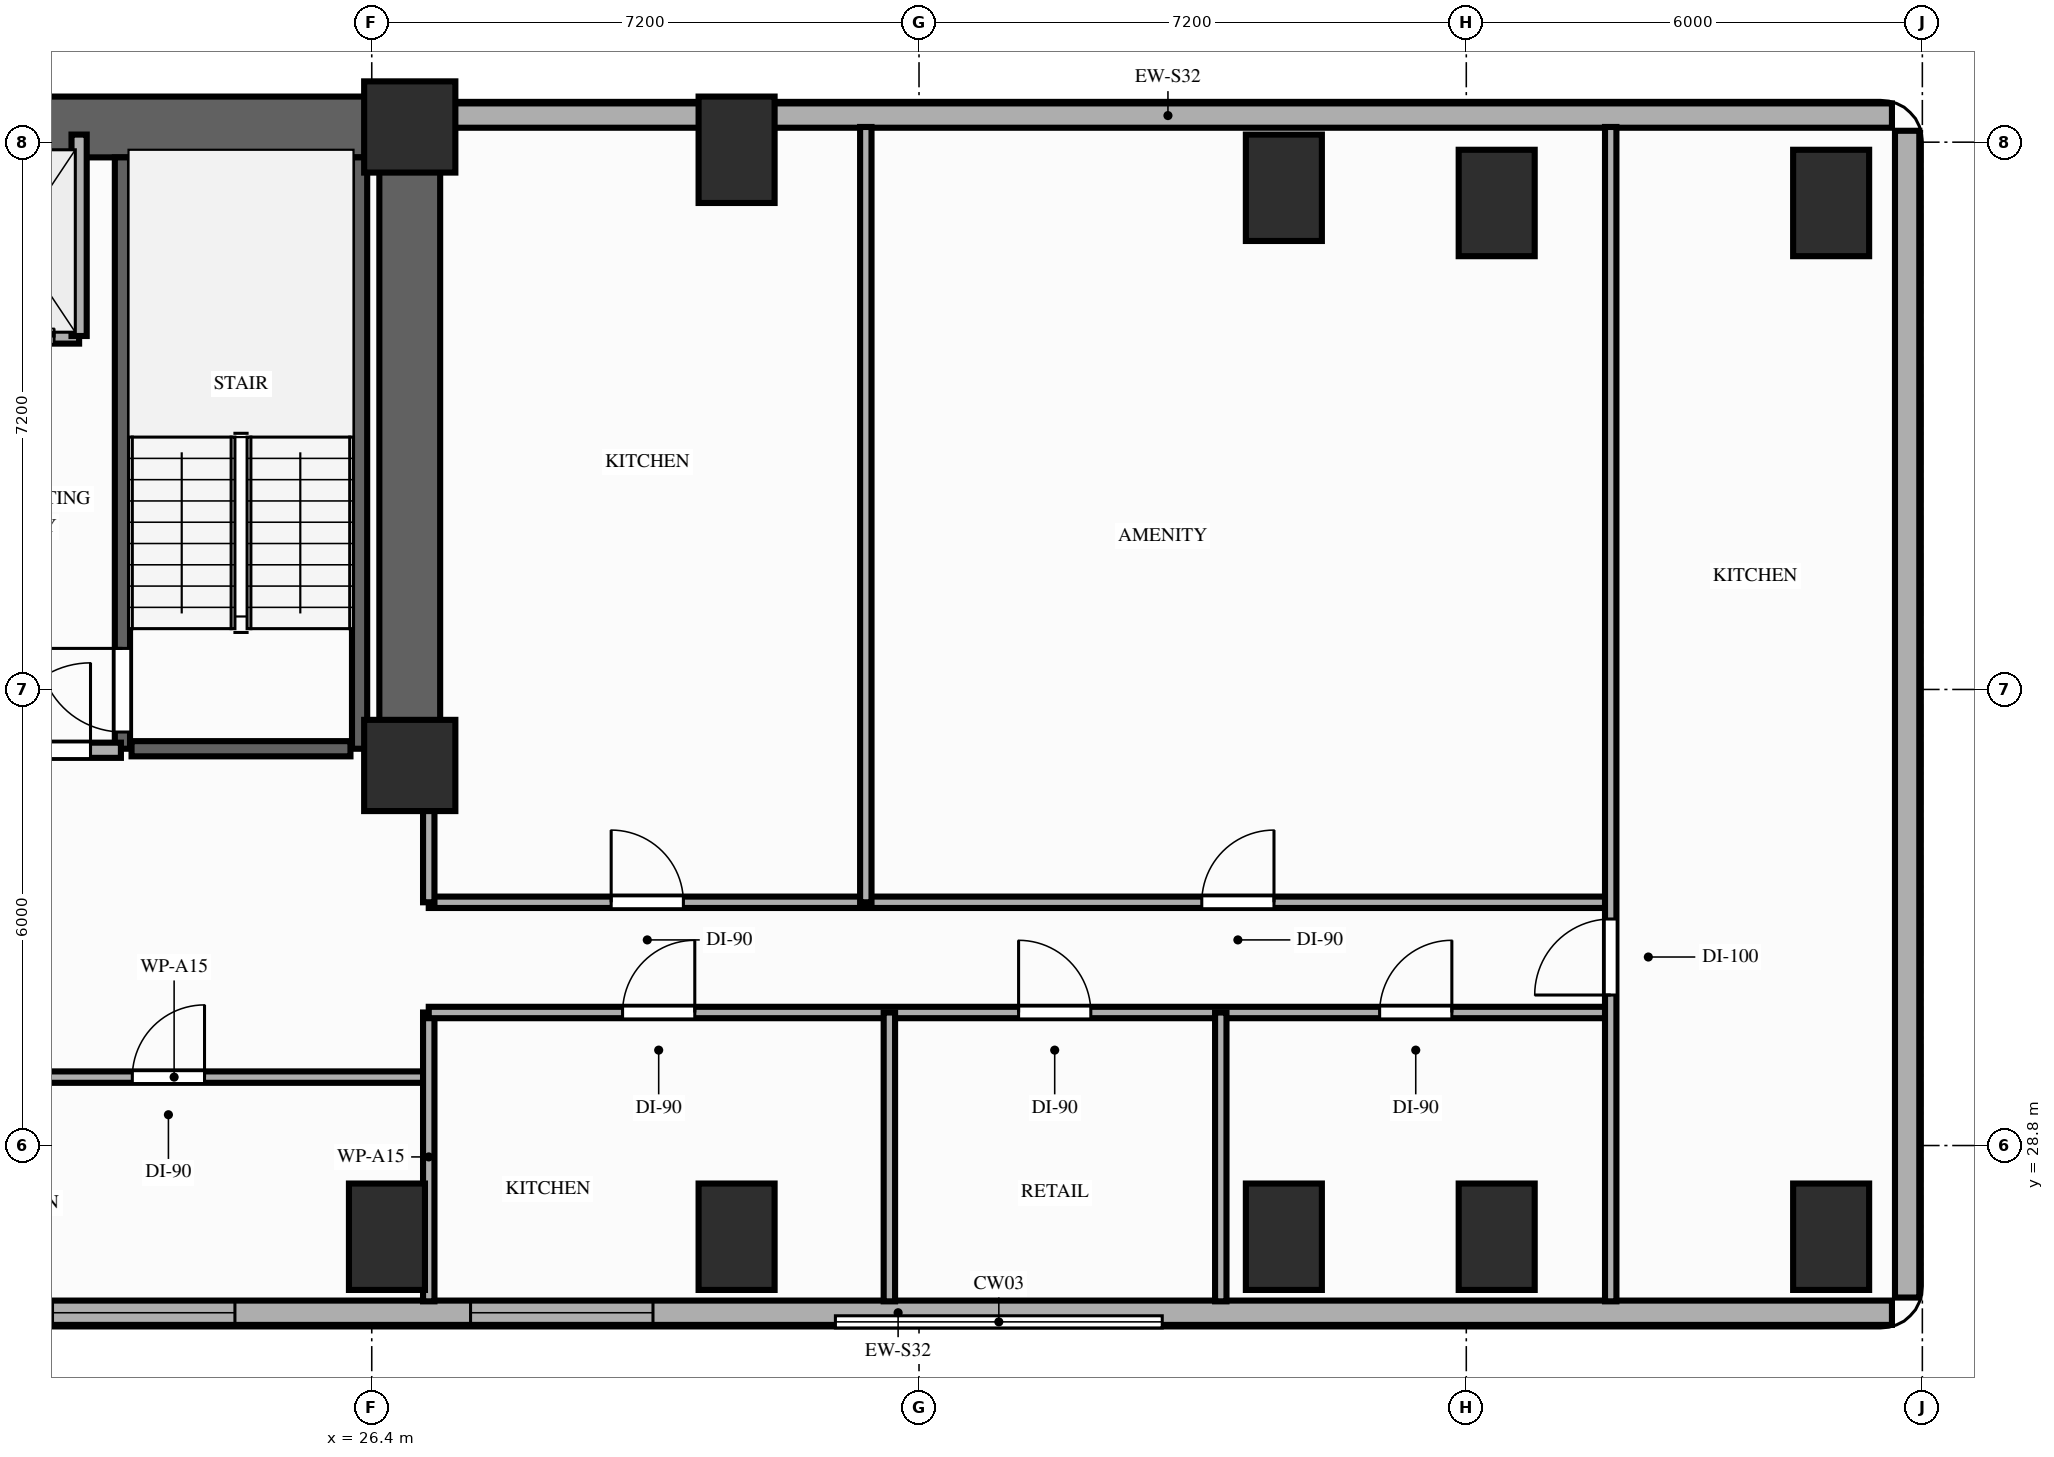
"""IFC4 building model, lengths in metres.
Left out: names, types, materials, properties, quantities, classifications, styles, units other than length and angle.
Written with IfcOpenShell. Run it as: python <this file> out.ifc"""

import sys

from ifc_helpers import new_model, si_unit, direction, frame, frame_2d, origin, origin_2d, place, context, subcontext, project, spatial, rectangle, extrude, element, fill, save


model = new_model("IFC4")
c1 = context("Model", 3, precision=1e-05, world=origin(), true_north=direction((0.0, 1.0)))
c2 = subcontext(c1, "Body", "Model", "MODEL_VIEW")
j1 = project(units=[si_unit("LENGTHUNIT", "METRE"), si_unit("PLANEANGLEUNIT", "RADIAN")], contexts=[c1])
p1 = place(None, origin())
s1 = spatial("IfcSite", under=j1, at=p1, CompositionType="ELEMENT")
p2 = place(p1, origin())
s2 = spatial("IfcBuilding", under=s1, at=p2, CompositionType="ELEMENT")
p3 = place(p2, frame((0.0, 0.0, 59.6)))
s3 = spatial("IfcBuildingStorey", under=s2, at=p3, CompositionType="ELEMENT", Elevation=59.6)
for number, where, z_axis, x_axis in (
    (1, (26.9, 33.8, 0.0), (0.0, 0.0, 1.0), (1.0, 0.0, 0.0)),
    (2, (26.9, 42.2, 0.0), (0.0, 0.0, 1.0), (1.0, 0.0, 0.0)),
):
    element("IfcColumn", number, at=place(p3, frame(where, z_axis=z_axis, x_axis=x_axis)), inside=s3, PredefinedType="COLUMN", context=c2, shape_type="SweptSolid", body=[
        extrude(rectangle(XDim=1.2, YDim=1.2, at=origin_2d()), origin(), (0.0, 0.0, 1.0), 3.2),
    ])
for number, where, z_axis, x_axis in (
    (3, (26.6, 27.6, 0.0), (0.0, 0.0, 1.0), (1.0, 0.0, 0.0)),
    (4, (31.2, 27.6, 0.0), (0.0, 0.0, 1.0), (1.0, 0.0, 0.0)),
    (5, (31.2, 41.9, 0.0), (0.0, 0.0, 1.0), (1.0, 0.0, 0.0)),
    (6, (38.4, 27.6, 0.0), (0.0, 0.0, 1.0), (1.0, 0.0, 0.0)),
    (7, (38.4, 41.4, 0.0), (0.0, 0.0, 1.0), (1.0, 0.0, 0.0)),
    (8, (41.2, 27.6, 0.0), (0.0, 0.0, 1.0), (1.0, 0.0, 0.0)),
    (9, (41.2, 41.2, 0.0), (0.0, 0.0, 1.0), (1.0, 0.0, 0.0)),
    (10, (45.6, 27.6, 0.0), (0.0, 0.0, 1.0), (1.0, 0.0, 0.0)),
    (11, (45.6, 41.2, 0.0), (0.0, 0.0, 1.0), (1.0, 0.0, 0.0)),
):
    element("IfcColumn", number, at=place(p3, frame(where, z_axis=z_axis, x_axis=x_axis)), inside=s3, PredefinedType="COLUMN", context=c2, shape_type="SweptSolid", body=[
        extrude(rectangle(XDim=1.0, YDim=1.4, at=origin_2d()), origin(), (0.0, 0.0, 1.0), 3.2),
    ])
p4 = place(p3, frame((46.4, 42.35, 0.0), z_axis=(0.0, 0.0, 1.0), x_axis=(-1.0, 0.0, 0.0)))
e12 = element("IfcWall", 12, at=p4, inside=s3, PredefinedType="STANDARD", context=c2, shape_type="SweptSolid", body=[
    extrude(rectangle(XDim=19.05, YDim=0.32, at=frame_2d((9.525, 0.0))), origin(), (0.0, 0.0, 1.0), 2.41),
])
p5 = place(p3, frame((20.25, 26.6, 0.0), z_axis=(0.0, 0.0, 1.0), x_axis=(1.0, 0.0, 0.0)))
e13 = element("IfcWall", 13, at=p5, inside=s3, PredefinedType="STANDARD", context=c2, shape_type="SweptSolid", body=[
    extrude(rectangle(XDim=26.15, YDim=0.32, at=frame_2d((13.075, 0.0))), origin(), (0.0, 0.0, 1.0), 2.7),
])
p6 = place(p5, frame((1.95, 0.0, 0.85)))
e14 = element("IfcOpeningElement", 14, at=p6, cuts=e13, PredefinedType="OPENING", context=c2, shape_type="SweptSolid", body=[
    extrude(rectangle(XDim=2.4, YDim=1.6, at=frame_2d((1.2, 0.8))), frame((0.0, 0.17, 0.0), z_axis=(0.0, -1.0, 0.0), x_axis=(1.0, 0.0, 0.0)), (0.0, 0.0, 1.0), 0.34),
])
p7 = place(p5, frame((7.45, 0.0, 0.85)))
e15 = element("IfcOpeningElement", 15, at=p7, cuts=e13, PredefinedType="OPENING", context=c2, shape_type="SweptSolid", body=[
    extrude(rectangle(XDim=2.4, YDim=1.6, at=frame_2d((1.2, 0.8))), frame((0.0, 0.17, 0.0), z_axis=(0.0, -1.0, 0.0), x_axis=(1.0, 0.0, 0.0)), (0.0, 0.0, 1.0), 0.34),
])
p8 = place(p3, frame((46.6, 26.8, 0.0), z_axis=(0.0, 0.0, 1.0), x_axis=(0.0, 1.0, 0.0)))
e16 = element("IfcWall", 16, at=p8, inside=s3, PredefinedType="STANDARD", context=c2, shape_type="SweptSolid", body=[
    extrude(rectangle(XDim=15.35, YDim=0.32, at=frame_2d((7.675, 0.0))), origin(), (0.0, 0.0, 1.0), 3.02),
])
p9 = place(p3, frame((6.45, 42.2, 0.0), z_axis=(0.0, 0.0, 1.0), x_axis=(1.0, 0.0, 0.0)))
e17 = element("IfcWall", 17, at=p9, inside=s3, PredefinedType="SHEAR", context=c2, shape_type="SweptSolid", body=[
    extrude(rectangle(XDim=20.45, YDim=0.8, at=frame_2d((10.225, 0.0))), origin(), (0.0, 0.0, 1.0), 3.02),
])
p10 = place(p3, frame((26.9, 33.8, 0.0), z_axis=(0.0, 0.0, 1.0), x_axis=(0.0, 1.0, 0.0)))
e18 = element("IfcWall", 18, at=p10, inside=s3, PredefinedType="SHEAR", context=c2, shape_type="SweptSolid", body=[
    extrude(rectangle(XDim=7.95, YDim=0.8, at=frame_2d((3.975, 0.0))), origin(), (0.0, 0.0, 1.0), 3.02),
])
p11 = place(p3, frame((23.12, 34.02, 0.0), z_axis=(0.0, 0.0, 1.0), x_axis=(0.0, 1.0, 0.0)))
e19 = element("IfcWall", 19, at=p11, inside=s3, PredefinedType="SHEAR", context=c2, shape_type="SweptSolid", body=[
    extrude(rectangle(XDim=7.78, YDim=0.2, at=frame_2d((3.89, 0.0))), origin(), (0.0, 0.0, 1.0), 3.02),
])
p12 = place(p11, frame((0.22, 0.0, 0.0)))
e20 = element("IfcOpeningElement", 20, at=p12, cuts=e19, PredefinedType="OPENING", context=c2, shape_type="SweptSolid", body=[
    extrude(rectangle(XDim=1.1, YDim=2.15, at=frame_2d((0.55, 1.075))), frame((0.0, 0.11, 0.0), z_axis=(0.0, -1.0, 0.0), x_axis=(1.0, 0.0, 0.0)), (0.0, 0.0, 1.0), 0.22),
])
p13 = place(p3, frame((26.24, 34.02, 0.0), z_axis=(0.0, 0.0, 1.0), x_axis=(0.0, 1.0, 0.0)))
e21 = element("IfcWall", 21, at=p13, inside=s3, PredefinedType="SHEAR", context=c2, shape_type="SweptSolid", body=[
    extrude(rectangle(XDim=7.78, YDim=0.2, at=frame_2d((3.89, 0.0))), origin(), (0.0, 0.0, 1.0), 3.02),
])
p14 = place(p3, frame((23.24, 34.02, 0.0), z_axis=(0.0, 0.0, 1.0), x_axis=(1.0, 0.0, 0.0)))
e22 = element("IfcWall", 22, at=p14, inside=s3, PredefinedType="SHEAR", context=c2, shape_type="SweptSolid", body=[
    extrude(rectangle(XDim=2.88, YDim=0.2, at=frame_2d((1.44, 0.0))), origin(), (0.0, 0.0, 1.0), 3.02),
])
p15 = place(p3, frame((20.85, 39.45, 0.0), z_axis=(0.0, 0.0, 1.0), x_axis=(1.0, 0.0, 0.0)))
e23 = element("IfcWall", 23, at=p15, inside=s3, PredefinedType="MOVABLE", context=c2, shape_type="SweptSolid", body=[
    extrude(rectangle(XDim=1.7, YDim=0.2, at=frame_2d((0.85, 0.0))), origin(), (0.0, 0.0, 1.0), 3.02),
])
p16 = place(p15, frame((0.32, 0.0, 0.0)))
e24 = element("IfcOpeningElement", 24, at=p16, cuts=e23, PredefinedType="OPENING", context=c2, shape_type="SweptSolid", body=[
    extrude(rectangle(XDim=1.05, YDim=2.15, at=frame_2d((0.525, 1.075))), frame((0.0, 0.11, 0.0), z_axis=(0.0, -1.0, 0.0), x_axis=(1.0, 0.0, 0.0)), (0.0, 0.0, 1.0), 0.22),
])
p17 = place(p3, frame((22.55, 39.45, 0.0), z_axis=(0.0, 0.0, 1.0), x_axis=(0.0, 1.0, 0.0)))
e25 = element("IfcWall", 25, at=p17, inside=s3, PredefinedType="MOVABLE", context=c2, shape_type="SweptSolid", body=[
    extrude(rectangle(XDim=2.65, YDim=0.2, at=frame_2d((1.325, 0.0))), origin(), (0.0, 0.0, 1.0), 2.41),
])
p18 = place(p3, frame((20.5, 34.0, 0.0), z_axis=(0.0, 0.0, 1.0), x_axis=(1.0, 0.0, 0.0)))
e26 = element("IfcWall", 26, at=p18, inside=s3, PredefinedType="PARTITIONING", context=c2, shape_type="SweptSolid", body=[
    extrude(rectangle(XDim=2.6, YDim=0.2, at=frame_2d((1.3, 0.0))), origin(), (0.0, 0.0, 1.0), 2.41),
])
p19 = place(p18, frame((1.05, 0.0, 0.0)))
e27 = element("IfcOpeningElement", 27, at=p19, cuts=e26, PredefinedType="OPENING", context=c2, shape_type="SweptSolid", body=[
    extrude(rectangle(XDim=1.15, YDim=2.15, at=frame_2d((0.575, 1.075))), frame((0.0, 0.11, 0.0), z_axis=(0.0, -1.0, 0.0), x_axis=(1.0, 0.0, 0.0)), (0.0, 0.0, 1.0), 0.22),
])
p20 = place(p3, frame((20.45, 29.7, 0.0), z_axis=(0.0, 0.0, 1.0), x_axis=(1.0, 0.0, 0.0)))
e28 = element("IfcWall", 28, at=p20, inside=s3, PredefinedType="PARTITIONING", context=c2, shape_type="SweptSolid", body=[
    extrude(rectangle(XDim=6.7, YDim=0.15, at=frame_2d((3.35, 0.0))), origin(), (0.0, 0.0, 1.0), 3.02),
])
p21 = place(p20, frame((2.8, 0.0, 0.0)))
e29 = element("IfcOpeningElement", 29, at=p21, cuts=e28, PredefinedType="OPENING", context=c2, shape_type="SweptSolid", body=[
    extrude(rectangle(XDim=0.95, YDim=2.15, at=frame_2d((0.475, 1.075))), frame((0.0, 0.085, 0.0), z_axis=(0.0, -1.0, 0.0), x_axis=(1.0, 0.0, 0.0)), (0.0, 0.0, 1.0), 0.17),
])
p22 = place(p3, frame((27.15, 26.75, 0.0), z_axis=(0.0, 0.0, 1.0), x_axis=(0.0, 1.0, 0.0)))
e30 = element("IfcWall", 30, at=p22, inside=s3, PredefinedType="PARTITIONING", context=c2, shape_type="SweptSolid", body=[
    extrude(rectangle(XDim=3.8, YDim=0.15, at=frame_2d((1.9, 0.0))), origin(), (0.0, 0.0, 1.0), 2.41),
])
p23 = place(p3, frame((27.15, 30.55, 0.0), z_axis=(0.0, 0.0, 1.0), x_axis=(1.0, 0.0, 0.0)))
e31 = element("IfcWall", 31, at=p23, inside=s3, PredefinedType="PARTITIONING", context=c2, shape_type="SweptSolid", body=[
    extrude(rectangle(XDim=15.55, YDim=0.15, at=frame_2d((7.775, 0.0))), origin(), (0.0, 0.0, 1.0), 2.41),
])
p24 = place(p23, frame((2.55, 0.0, 0.0)))
e32 = element("IfcOpeningElement", 32, at=p24, cuts=e31, PredefinedType="OPENING", context=c2, shape_type="SweptSolid", body=[
    extrude(rectangle(XDim=0.95, YDim=2.15, at=frame_2d((0.475, 1.075))), frame((0.0, 0.085, 0.0), z_axis=(0.0, -1.0, 0.0), x_axis=(1.0, 0.0, 0.0)), (0.0, 0.0, 1.0), 0.17),
])
p25 = place(p23, frame((7.76, 0.0, 0.0)))
e33 = element("IfcOpeningElement", 33, at=p25, cuts=e31, PredefinedType="OPENING", context=c2, shape_type="SweptSolid", body=[
    extrude(rectangle(XDim=0.95, YDim=2.15, at=frame_2d((0.475, 1.075))), frame((0.0, 0.085, 0.0), z_axis=(0.0, -1.0, 0.0), x_axis=(1.0, 0.0, 0.0)), (0.0, 0.0, 1.0), 0.17),
])
p26 = place(p23, frame((12.51, 0.0, 0.0)))
e34 = element("IfcOpeningElement", 34, at=p26, cuts=e31, PredefinedType="OPENING", context=c2, shape_type="SweptSolid", body=[
    extrude(rectangle(XDim=0.95, YDim=2.15, at=frame_2d((0.475, 1.075))), frame((0.0, 0.085, 0.0), z_axis=(0.0, -1.0, 0.0), x_axis=(1.0, 0.0, 0.0)), (0.0, 0.0, 1.0), 0.17),
])
p27 = place(p3, frame((27.15, 32.0, 0.0), z_axis=(0.0, 0.0, 1.0), x_axis=(1.0, 0.0, 0.0)))
e35 = element("IfcWall", 35, at=p27, inside=s3, PredefinedType="PARTITIONING", context=c2, shape_type="SweptSolid", body=[
    extrude(rectangle(XDim=15.55, YDim=0.15, at=frame_2d((7.775, 0.0))), origin(), (0.0, 0.0, 1.0), 2.41),
])
p28 = place(p27, frame((2.4, 0.0, 0.0)))
e36 = element("IfcOpeningElement", 36, at=p28, cuts=e35, PredefinedType="OPENING", context=c2, shape_type="SweptSolid", body=[
    extrude(rectangle(XDim=0.95, YDim=2.15, at=frame_2d((0.475, 1.075))), frame((0.0, 0.085, 0.0), z_axis=(0.0, -1.0, 0.0), x_axis=(1.0, 0.0, 0.0)), (0.0, 0.0, 1.0), 0.17),
])
p29 = place(p27, frame((10.17, 0.0, 0.0)))
e37 = element("IfcOpeningElement", 37, at=p29, cuts=e35, PredefinedType="OPENING", context=c2, shape_type="SweptSolid", body=[
    extrude(rectangle(XDim=0.95, YDim=2.15, at=frame_2d((0.475, 1.075))), frame((0.0, 0.085, 0.0), z_axis=(0.0, -1.0, 0.0), x_axis=(1.0, 0.0, 0.0)), (0.0, 0.0, 1.0), 0.17),
])
p30 = place(p3, frame((27.15, 32.0, 0.0), z_axis=(0.0, 0.0, 1.0), x_axis=(0.0, 1.0, 0.0)))
e38 = element("IfcWall", 38, at=p30, inside=s3, PredefinedType="PARTITIONING", context=c2, shape_type="SweptSolid", body=[
    extrude(rectangle(XDim=1.68, YDim=0.15, at=frame_2d((0.84, 0.0))), origin(), (0.0, 0.0, 1.0), 2.41),
])
p31 = place(p3, frame((42.7, 26.75, 0.0), z_axis=(0.0, 0.0, 1.0), x_axis=(0.0, 1.0, 0.0)))
e39 = element("IfcWall", 39, at=p31, inside=s3, PredefinedType="PARTITIONING", context=c2, shape_type="SweptSolid", body=[
    extrude(rectangle(XDim=15.45, YDim=0.15, at=frame_2d((7.725, 0.0))), origin(), (0.0, 0.0, 1.0), 2.41),
])
p32 = place(p31, frame((4.03, 0.0, 0.0)))
e40 = element("IfcOpeningElement", 40, at=p32, cuts=e39, PredefinedType="OPENING", context=c2, shape_type="SweptSolid", body=[
    extrude(rectangle(XDim=1.0, YDim=2.15, at=frame_2d((0.5, 1.075))), frame((0.0, 0.085, 0.0), z_axis=(0.0, -1.0, 0.0), x_axis=(1.0, 0.0, 0.0)), (0.0, 0.0, 1.0), 0.17),
])
for number, where, z_axis, x_axis in (
    (41, (33.21, 26.75, 0.0), (0.0, 0.0, 1.0), (0.0, 1.0, 0.0)),
    (42, (37.57, 26.75, 0.0), (0.0, 0.0, 1.0), (0.0, 1.0, 0.0)),
):
    element("IfcWall", number, at=place(p3, frame(where, z_axis=z_axis, x_axis=x_axis)), inside=s3, PredefinedType="PARTITIONING", context=c2, shape_type="SweptSolid", body=[
        extrude(rectangle(XDim=3.8, YDim=0.15, at=frame_2d((1.9, 0.0))), origin(), (0.0, 0.0, 1.0), 2.41),
    ])
p33 = place(p3, frame((32.9, 32.0, 0.0), z_axis=(0.0, 0.0, 1.0), x_axis=(0.0, 1.0, 0.0)))
e43 = element("IfcWall", 43, at=p33, inside=s3, PredefinedType="PARTITIONING", context=c2, shape_type="SweptSolid", body=[
    extrude(rectangle(XDim=10.2, YDim=0.15, at=frame_2d((5.1, 0.0))), origin(), (0.0, 0.0, 1.0), 2.41),
])
p34 = place(p6, origin())
e44 = element("IfcWindow", 44, at=p34, inside=s3, PartitioningType="SINGLE_PANEL", PredefinedType="WINDOW", context=c2, shape_type="SweptSolid", body=[
    extrude(rectangle(XDim=2.4, YDim=1.6, at=frame_2d((1.2, 0.8))), frame((0.0, 0.03, 0.0), z_axis=(0.0, -1.0, 0.0), x_axis=(1.0, 0.0, 0.0)), (0.0, 0.0, 1.0), 0.06),
])
fill(e14, e44)
p35 = place(p7, origin())
e45 = element("IfcWindow", 45, at=p35, inside=s3, PartitioningType="SINGLE_PANEL", PredefinedType="WINDOW", context=c2, shape_type="SweptSolid", body=[
    extrude(rectangle(XDim=2.4, YDim=1.6, at=frame_2d((1.2, 0.8))), frame((0.0, 0.03, 0.0), z_axis=(0.0, -1.0, 0.0), x_axis=(1.0, 0.0, 0.0)), (0.0, 0.0, 1.0), 0.06),
])
fill(e15, e45)
p36 = place(p12, origin())
e46 = element("IfcDoor", 46, at=p36, inside=s3, OperationType="SINGLE_SWING_RIGHT", PredefinedType="DOOR", context=c2, shape_type="SweptSolid", body=[
    extrude(rectangle(XDim=1.1, YDim=2.15, at=frame_2d((0.55, 1.075))), frame((0.0, 0.025, 0.0), z_axis=(0.0, -1.0, 0.0), x_axis=(1.0, 0.0, 0.0)), (0.0, 0.0, 1.0), 0.05),
])
fill(e20, e46)
p37 = place(p16, origin())
e47 = element("IfcDoor", 47, at=p37, inside=s3, OperationType="SLIDING_TO_LEFT", PredefinedType="DOOR", context=c2, shape_type="SweptSolid", body=[
    extrude(rectangle(XDim=1.05, YDim=2.15, at=frame_2d((0.525, 1.075))), frame((0.0, 0.025, 0.0), z_axis=(0.0, -1.0, 0.0), x_axis=(1.0, 0.0, 0.0)), (0.0, 0.0, 1.0), 0.05),
])
fill(e24, e47)
p38 = place(p19, origin())
e48 = element("IfcDoor", 48, at=p38, inside=s3, OperationType="SINGLE_SWING_RIGHT", PredefinedType="DOOR", context=c2, shape_type="SweptSolid", body=[
    extrude(rectangle(XDim=1.15, YDim=2.15, at=frame_2d((0.575, 1.075))), frame((0.0, 0.025, 0.0), z_axis=(0.0, -1.0, 0.0), x_axis=(1.0, 0.0, 0.0)), (0.0, 0.0, 1.0), 0.05),
])
fill(e27, e48)
p39 = place(p21, origin())
e49 = element("IfcDoor", 49, at=p39, inside=s3, OperationType="SINGLE_SWING_RIGHT", PredefinedType="DOOR", context=c2, shape_type="SweptSolid", body=[
    extrude(rectangle(XDim=0.95, YDim=2.15, at=frame_2d((0.475, 1.075))), frame((0.0, 0.025, 0.0), z_axis=(0.0, -1.0, 0.0), x_axis=(1.0, 0.0, 0.0)), (0.0, 0.0, 1.0), 0.05),
])
fill(e29, e49)
p40 = place(p32, origin())
e50 = element("IfcDoor", 50, at=p40, inside=s3, OperationType="SINGLE_SWING_LEFT", PredefinedType="DOOR", context=c2, shape_type="SweptSolid", body=[
    extrude(rectangle(XDim=1.0, YDim=2.15, at=frame_2d((0.5, 1.075))), frame((0.0, 0.025, 0.0), z_axis=(0.0, -1.0, 0.0), x_axis=(1.0, 0.0, 0.0)), (0.0, 0.0, 1.0), 0.05),
])
fill(e40, e50)
p41 = place(p24, origin())
e51 = element("IfcDoor", 51, at=p41, inside=s3, OperationType="SINGLE_SWING_RIGHT", PredefinedType="DOOR", context=c2, shape_type="SweptSolid", body=[
    extrude(rectangle(XDim=0.95, YDim=2.15, at=frame_2d((0.475, 1.075))), frame((0.0, 0.025, 0.0), z_axis=(0.0, -1.0, 0.0), x_axis=(1.0, 0.0, 0.0)), (0.0, 0.0, 1.0), 0.05),
])
fill(e32, e51)
p42 = place(p25, origin())
e52 = element("IfcDoor", 52, at=p42, inside=s3, OperationType="SINGLE_SWING_LEFT", PredefinedType="DOOR", context=c2, shape_type="SweptSolid", body=[
    extrude(rectangle(XDim=0.95, YDim=2.15, at=frame_2d((0.475, 1.075))), frame((0.0, 0.025, 0.0), z_axis=(0.0, -1.0, 0.0), x_axis=(1.0, 0.0, 0.0)), (0.0, 0.0, 1.0), 0.05),
])
fill(e33, e52)
p43 = place(p26, origin())
e53 = element("IfcDoor", 53, at=p43, inside=s3, OperationType="SINGLE_SWING_RIGHT", PredefinedType="DOOR", context=c2, shape_type="SweptSolid", body=[
    extrude(rectangle(XDim=0.95, YDim=2.15, at=frame_2d((0.475, 1.075))), frame((0.0, 0.025, 0.0), z_axis=(0.0, -1.0, 0.0), x_axis=(1.0, 0.0, 0.0)), (0.0, 0.0, 1.0), 0.05),
])
fill(e34, e53)
p44 = place(p28, origin())
e54 = element("IfcDoor", 54, at=p44, inside=s3, OperationType="SINGLE_SWING_LEFT", PredefinedType="DOOR", context=c2, shape_type="SweptSolid", body=[
    extrude(rectangle(XDim=0.95, YDim=2.15, at=frame_2d((0.475, 1.075))), frame((0.0, 0.025, 0.0), z_axis=(0.0, -1.0, 0.0), x_axis=(1.0, 0.0, 0.0)), (0.0, 0.0, 1.0), 0.05),
])
fill(e36, e54)
p45 = place(p29, origin())
e55 = element("IfcDoor", 55, at=p45, inside=s3, OperationType="SINGLE_SWING_RIGHT", PredefinedType="DOOR", context=c2, shape_type="SweptSolid", body=[
    extrude(rectangle(XDim=0.95, YDim=2.15, at=frame_2d((0.475, 1.075))), frame((0.0, 0.025, 0.0), z_axis=(0.0, -1.0, 0.0), x_axis=(1.0, 0.0, 0.0)), (0.0, 0.0, 1.0), 0.05),
])
fill(e37, e55)
save(model, sys.argv[1])
